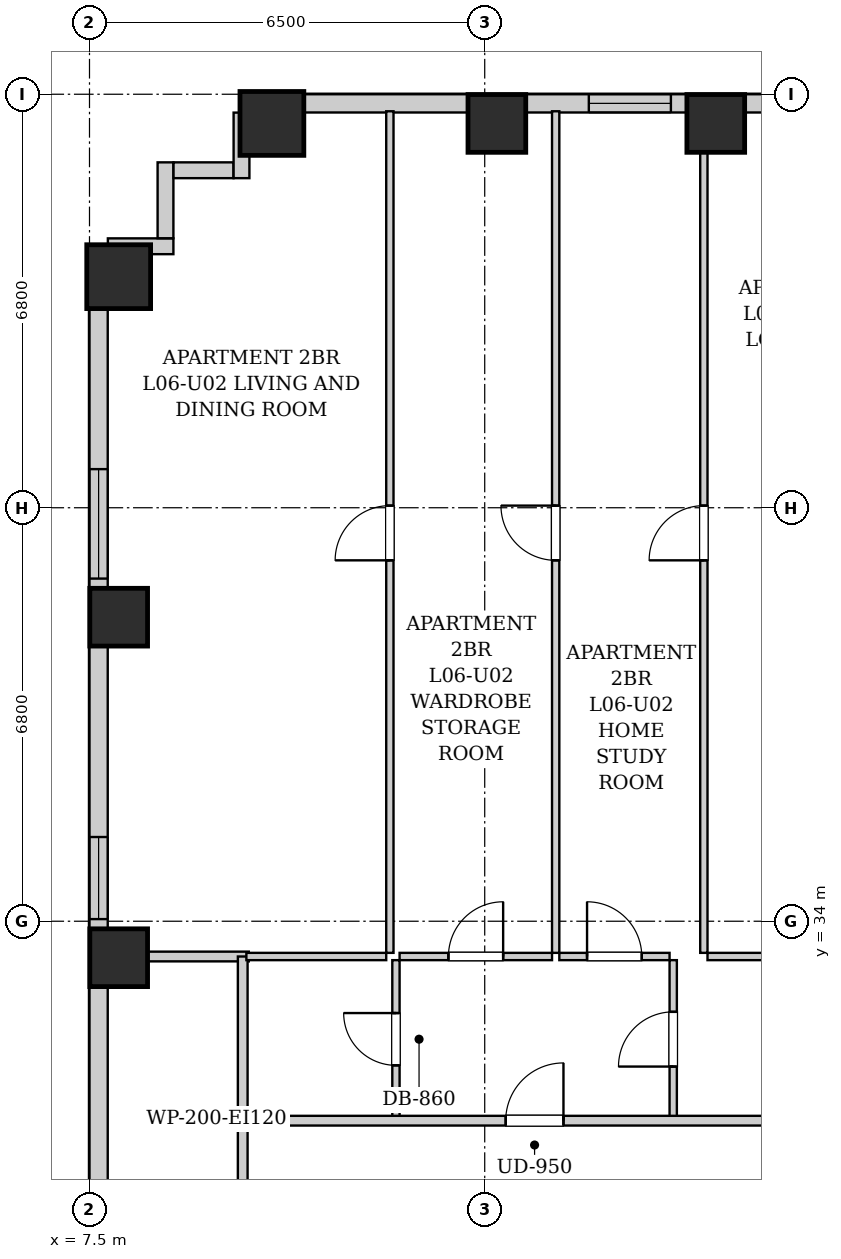
"""IFC4 building model, lengths in metres.
Left out: names, types, materials, properties, quantities, classifications, styles, units other than length and angle.
Written with IfcOpenShell. Run it as: python <this file> out.ifc"""

import sys

from ifc_helpers import new_model, si_unit, direction, frame, frame_2d, origin, origin_2d, place, context, subcontext, project, spatial, rectangle, extrude, element, fill, save


model = new_model("IFC4")
c1 = context("Model", 3, precision=1e-05, world=origin(), true_north=direction((0.0, 1.0)))
c2 = subcontext(c1, "Body", "Model", "MODEL_VIEW")
j1 = project(units=[si_unit("LENGTHUNIT", "METRE"), si_unit("PLANEANGLEUNIT", "RADIAN")], contexts=[c1])
p1 = place(None, origin())
s1 = spatial("IfcSite", under=j1, at=p1, CompositionType="ELEMENT")
p2 = place(p1, origin())
s2 = spatial("IfcBuilding", under=s1, at=p2, CompositionType="ELEMENT")
p3 = place(p2, frame((0.0, 0.0, 29.0)))
s3 = spatial("IfcBuildingStorey", under=s2, at=p3, CompositionType="ELEMENT", Elevation=29.0)
p4 = place(p3, frame((10.5, 47.12, 0.0), z_axis=(0.0, 0.0, 1.0), x_axis=(1.0, 0.0, 0.0)))
e1 = element("IfcColumn", 1, at=p4, inside=s3, PredefinedType="COLUMN", context=c2, shape_type="SweptSolid", body=[
    extrude(rectangle(XDim=1.05, YDim=1.05, at=origin_2d()), origin(), (0.0, 0.0, 1.0), 3.2),
])
for number, where, z_axis, x_axis in (
    (2, (14.2, 47.12, 0.0), (0.0, 0.0, 1.0), (1.0, 0.0, 0.0)),
    (3, (17.8, 47.12, 0.0), (0.0, 0.0, 1.0), (1.0, 0.0, 0.0)),
    (4, (7.98, 33.4, 0.0), (0.0, 0.0, 1.0), (1.0, 0.0, 0.0)),
    (5, (7.98, 39.0, 0.0), (0.0, 0.0, 1.0), (1.0, 0.0, 0.0)),
):
    element("IfcColumn", number, at=place(p3, frame(where, z_axis=z_axis, x_axis=x_axis)), inside=s3, PredefinedType="COLUMN", context=c2, shape_type="SweptSolid", body=[
        extrude(rectangle(XDim=0.95, YDim=0.95, at=origin_2d()), origin(), (0.0, 0.0, 1.0), 3.2),
    ])
p5 = place(p3, frame((7.98, 44.6, 0.0), z_axis=(0.0, 0.0, 1.0), x_axis=(1.0, 0.0, 0.0)))
e6 = element("IfcColumn", 6, at=p5, inside=s3, PredefinedType="COLUMN", context=c2, shape_type="SweptSolid", body=[
    extrude(rectangle(XDim=1.05, YDim=1.05, at=origin_2d()), origin(), (0.0, 0.0, 1.0), 3.2),
])
p6 = place(p3, frame((10.0, 47.45, 0.0), z_axis=(0.0, 0.0, 1.0), x_axis=(1.0, 0.0, 0.0)))
e7 = element("IfcWall", 7, at=p6, inside=s3, PredefinedType="SOLIDWALL", context=c2, shape_type="SweptSolid", body=[
    extrude(rectangle(XDim=28.1, YDim=0.3, at=frame_2d((14.05, 0.0))), origin(), (0.0, 0.0, 1.0), 1.975),
])
p7 = place(p6, frame((5.712, 0.0, 0.55)))
e8 = element("IfcOpeningElement", 8, at=p7, cuts=e7, PredefinedType="OPENING", context=c2, shape_type="SweptSolid", body=[
    extrude(rectangle(XDim=1.35, YDim=1.2, at=frame_2d((0.675, 0.6))), frame((0.0, 0.16, 0.0), z_axis=(0.0, -1.0, 0.0), x_axis=(1.0, 0.0, 0.0)), (0.0, 0.0, 1.0), 0.32),
])
p8 = place(p6, frame((8.792, 0.0, 0.55)))
e9 = element("IfcOpeningElement", 9, at=p8, cuts=e7, PredefinedType="OPENING", context=c2, shape_type="SweptSolid", body=[
    extrude(rectangle(XDim=1.8, YDim=1.2, at=frame_2d((0.9, 0.6))), frame((0.0, 0.16, 0.0), z_axis=(0.0, -1.0, 0.0), x_axis=(1.0, 0.0, 0.0)), (0.0, 0.0, 1.0), 0.32),
])
p9 = place(p6, frame((18.86, 0.0, 0.55)))
e10 = element("IfcOpeningElement", 10, at=p9, cuts=e7, PredefinedType="OPENING", context=c2, shape_type="SweptSolid", body=[
    extrude(rectangle(XDim=1.8, YDim=1.2, at=frame_2d((0.9, 0.6))), frame((0.0, 0.16, 0.0), z_axis=(0.0, -1.0, 0.0), x_axis=(1.0, 0.0, 0.0)), (0.0, 0.0, 1.0), 0.32),
])
p10 = place(p6, frame((21.215, 0.0, 0.55)))
e11 = element("IfcOpeningElement", 11, at=p10, cuts=e7, PredefinedType="OPENING", context=c2, shape_type="SweptSolid", body=[
    extrude(rectangle(XDim=1.35, YDim=1.2, at=frame_2d((0.675, 0.6))), frame((0.0, 0.16, 0.0), z_axis=(0.0, -1.0, 0.0), x_axis=(1.0, 0.0, 0.0)), (0.0, 0.0, 1.0), 0.32),
])
p11 = place(p6, frame((23.969, 0.0, 0.55)))
e12 = element("IfcOpeningElement", 12, at=p11, cuts=e7, PredefinedType="OPENING", context=c2, shape_type="SweptSolid", body=[
    extrude(rectangle(XDim=1.8, YDim=1.2, at=frame_2d((0.9, 0.6))), frame((0.0, 0.16, 0.0), z_axis=(0.0, -1.0, 0.0), x_axis=(1.0, 0.0, 0.0)), (0.0, 0.0, 1.0), 0.32),
])
p12 = place(p6, frame((26.698, 0.0, 0.55)))
e13 = element("IfcOpeningElement", 13, at=p12, cuts=e7, PredefinedType="OPENING", context=c2, shape_type="SweptSolid", body=[
    extrude(rectangle(XDim=0.85, YDim=1.2, at=frame_2d((0.425, 0.6))), frame((0.0, 0.16, 0.0), z_axis=(0.0, -1.0, 0.0), x_axis=(1.0, 0.0, 0.0)), (0.0, 0.0, 1.0), 0.32),
])
p13 = place(p3, frame((7.65, 19.4, 0.0), z_axis=(0.0, 0.0, 1.0), x_axis=(0.0, 1.0, 0.0)))
e14 = element("IfcWall", 14, at=p13, inside=s3, PredefinedType="SOLIDWALL", context=c2, shape_type="SweptSolid", body=[
    extrude(rectangle(XDim=25.7, YDim=0.3, at=frame_2d((12.85, 0.0))), origin(), (0.0, 0.0, 1.0), 1.975),
])
p14 = place(p13, frame((20.235, 0.0, 0.55)))
e15 = element("IfcOpeningElement", 15, at=p14, cuts=e14, PredefinedType="OPENING", context=c2, shape_type="SweptSolid", body=[
    extrude(rectangle(XDim=1.8, YDim=1.2, at=frame_2d((0.9, 0.6))), frame((0.0, 0.16, 0.0), z_axis=(0.0, -1.0, 0.0), x_axis=(1.0, 0.0, 0.0)), (0.0, 0.0, 1.0), 0.32),
])
p15 = place(p13, frame((14.635, 0.0, 0.55)))
e16 = element("IfcOpeningElement", 16, at=p15, cuts=e14, PredefinedType="OPENING", context=c2, shape_type="SweptSolid", body=[
    extrude(rectangle(XDim=1.35, YDim=1.2, at=frame_2d((0.675, 0.6))), frame((0.0, 0.16, 0.0), z_axis=(0.0, -1.0, 0.0), x_axis=(1.0, 0.0, 0.0)), (0.0, 0.0, 1.0), 0.32),
])
p16 = place(p3, frame((7.802, 45.1, 0.0), z_axis=(0.0, 0.0, 1.0), x_axis=(1.0, 0.0, 0.0)))
e17 = element("IfcWall", 17, at=p16, inside=s3, PredefinedType="SOLIDWALL", context=c2, shape_type="SweptSolid", body=[
    extrude(rectangle(XDim=1.078, YDim=0.26, at=frame_2d((0.539, 0.0))), origin(), (0.0, 0.0, 1.0), 2.94),
])
p17 = place(p3, frame((8.75, 45.232, 0.0), z_axis=(0.0, 0.0, 1.0), x_axis=(0.0, 1.0, 0.0)))
e18 = element("IfcWall", 18, at=p17, inside=s3, PredefinedType="SOLIDWALL", context=c2, shape_type="SweptSolid", body=[
    extrude(rectangle(XDim=1.248, YDim=0.26, at=frame_2d((0.624, 0.0))), origin(), (0.0, 0.0, 1.0), 2.94),
])
p18 = place(p3, frame((8.882, 46.35, 0.0), z_axis=(0.0, 0.0, 1.0), x_axis=(1.0, 0.0, 0.0)))
e19 = element("IfcWall", 19, at=p18, inside=s3, PredefinedType="SOLIDWALL", context=c2, shape_type="SweptSolid", body=[
    extrude(rectangle(XDim=0.986, YDim=0.26, at=frame_2d((0.493, 0.0))), origin(), (0.0, 0.0, 1.0), 2.94),
])
p19 = place(p3, frame((10.0, 46.22, 0.0), z_axis=(0.0, 0.0, 1.0), x_axis=(0.0, 1.0, 0.0)))
e20 = element("IfcWall", 20, at=p19, inside=s3, PredefinedType="SOLIDWALL", context=c2, shape_type="SweptSolid", body=[
    extrude(rectangle(XDim=1.078, YDim=0.26, at=frame_2d((0.539, 0.0))), origin(), (0.0, 0.0, 1.0), 2.94),
])
p20 = place(p3, frame((10.02, 28.98, 0.0), z_axis=(0.0, 0.0, 1.0), x_axis=(0.0, 1.0, 0.0)))
e21 = element("IfcWall", 21, at=p20, inside=s3, PredefinedType="PARTITIONING", context=c2, shape_type="SweptSolid", body=[
    extrude(rectangle(XDim=1.74, YDim=0.16, at=frame_2d((0.87, 0.0))), origin(), (0.0, 0.0, 1.0), 2.94),
])
p21 = place(p3, frame((7.78, 33.42, 0.0), z_axis=(0.0, 0.0, 1.0), x_axis=(1.0, 0.0, 0.0)))
e22 = element("IfcWall", 22, at=p21, inside=s3, PredefinedType="PARTITIONING", context=c2, shape_type="SweptSolid", body=[
    extrude(rectangle(XDim=2.34, YDim=0.16, at=frame_2d((1.17, 0.0))), origin(), (0.0, 0.0, 1.0), 2.94),
])
p22 = place(p3, frame((10.02, 30.76, 0.0), z_axis=(0.0, 0.0, 1.0), x_axis=(0.0, 1.0, 0.0)))
e23 = element("IfcWall", 23, at=p22, inside=s3, PredefinedType="PARTITIONING", context=c2, shape_type="SweptSolid", body=[
    extrude(rectangle(XDim=2.66, YDim=0.16, at=frame_2d((1.33, 0.0))), origin(), (0.0, 0.0, 1.0), 2.94),
])
p23 = place(p3, frame((12.54, 30.76, 0.0), z_axis=(0.0, 0.0, 1.0), x_axis=(0.0, 1.0, 0.0)))
e24 = element("IfcWall", 24, at=p23, inside=s3, PredefinedType="PARTITIONING", context=c2, shape_type="SweptSolid", body=[
    extrude(rectangle(XDim=2.6, YDim=0.12, at=frame_2d((1.3, 0.0))), origin(), (0.0, 0.0, 1.0), 2.94),
])
p24 = place(p23, frame((0.87, 0.0, 0.0)))
e25 = element("IfcOpeningElement", 25, at=p24, cuts=e24, PredefinedType="OPENING", context=c2, shape_type="SweptSolid", body=[
    extrude(rectangle(XDim=0.86, YDim=2.05, at=frame_2d((0.43, 1.025))), frame((0.0, 0.07, 0.0), z_axis=(0.0, -1.0, 0.0), x_axis=(1.0, 0.0, 0.0)), (0.0, 0.0, 1.0), 0.14),
])
p25 = place(p3, frame((10.08, 33.42, 0.0), z_axis=(0.0, 0.0, 1.0), x_axis=(1.0, 0.0, 0.0)))
e26 = element("IfcWall", 26, at=p25, inside=s3, PredefinedType="PARTITIONING", context=c2, shape_type="SweptSolid", body=[
    extrude(rectangle(XDim=2.3, YDim=0.12, at=frame_2d((1.15, 0.0))), origin(), (0.0, 0.0, 1.0), 2.94),
])
p26 = place(p3, frame((17.1, 30.76, 0.0), z_axis=(0.0, 0.0, 1.0), x_axis=(0.0, 1.0, 0.0)))
e27 = element("IfcWall", 27, at=p26, inside=s3, PredefinedType="PARTITIONING", context=c2, shape_type="SweptSolid", body=[
    extrude(rectangle(XDim=2.6, YDim=0.12, at=frame_2d((1.3, 0.0))), origin(), (0.0, 0.0, 1.0), 2.94),
])
p27 = place(p26, frame((0.85, 0.0, 0.0)))
e28 = element("IfcOpeningElement", 28, at=p27, cuts=e27, PredefinedType="OPENING", context=c2, shape_type="SweptSolid", body=[
    extrude(rectangle(XDim=0.9, YDim=2.05, at=frame_2d((0.45, 1.025))), frame((0.0, 0.07, 0.0), z_axis=(0.0, -1.0, 0.0), x_axis=(1.0, 0.0, 0.0)), (0.0, 0.0, 1.0), 0.14),
])
p28 = place(p3, frame((12.6, 33.42, 0.0), z_axis=(0.0, 0.0, 1.0), x_axis=(1.0, 0.0, 0.0)))
e29 = element("IfcWall", 29, at=p28, inside=s3, PredefinedType="PARTITIONING", context=c2, shape_type="SweptSolid", body=[
    extrude(rectangle(XDim=2.507, YDim=0.12, at=frame_2d((1.253, 0.0))), origin(), (0.0, 0.0, 1.0), 2.94),
])
p29 = place(p28, frame((0.803, 0.0, 0.0)))
e30 = element("IfcOpeningElement", 30, at=p29, cuts=e29, PredefinedType="OPENING", context=c2, shape_type="SweptSolid", body=[
    extrude(rectangle(XDim=0.9, YDim=2.05, at=frame_2d((0.45, 1.025))), frame((0.0, 0.07, 0.0), z_axis=(0.0, -1.0, 0.0), x_axis=(1.0, 0.0, 0.0)), (0.0, 0.0, 1.0), 0.14),
])
p30 = place(p3, frame((15.227, 33.42, 0.0), z_axis=(0.0, 0.0, 1.0), x_axis=(1.0, 0.0, 0.0)))
e31 = element("IfcWall", 31, at=p30, inside=s3, PredefinedType="PARTITIONING", context=c2, shape_type="SweptSolid", body=[
    extrude(rectangle(XDim=1.813, YDim=0.12, at=frame_2d((0.906, 0.0))), origin(), (0.0, 0.0, 1.0), 2.94),
])
p31 = place(p30, frame((0.456, 0.0, 0.0)))
e32 = element("IfcOpeningElement", 32, at=p31, cuts=e31, PredefinedType="OPENING", context=c2, shape_type="SweptSolid", body=[
    extrude(rectangle(XDim=0.9, YDim=2.05, at=frame_2d((0.45, 1.025))), frame((0.0, 0.07, 0.0), z_axis=(0.0, -1.0, 0.0), x_axis=(1.0, 0.0, 0.0)), (0.0, 0.0, 1.0), 0.14),
])
p32 = place(p3, frame((17.664, 33.42, 0.0), z_axis=(0.0, 0.0, 1.0), x_axis=(1.0, 0.0, 0.0)))
e33 = element("IfcWall", 33, at=p32, inside=s3, PredefinedType="PARTITIONING", context=c2, shape_type="SweptSolid", body=[
    extrude(rectangle(XDim=3.096, YDim=0.12, at=frame_2d((1.548, 0.0))), origin(), (0.0, 0.0, 1.0), 2.94),
])
p33 = place(p32, frame((1.098, 0.0, 0.0)))
e34 = element("IfcOpeningElement", 34, at=p33, cuts=e33, PredefinedType="OPENING", context=c2, shape_type="SweptSolid", body=[
    extrude(rectangle(XDim=0.9, YDim=2.05, at=frame_2d((0.45, 1.025))), frame((0.0, 0.07, 0.0), z_axis=(0.0, -1.0, 0.0), x_axis=(1.0, 0.0, 0.0)), (0.0, 0.0, 1.0), 0.14),
])
p34 = place(p3, frame((12.44, 33.48, 0.0), z_axis=(0.0, 0.0, 1.0), x_axis=(0.0, 1.0, 0.0)))
e35 = element("IfcWall", 35, at=p34, inside=s3, PredefinedType="PARTITIONING", context=c2, shape_type="SweptSolid", body=[
    extrude(rectangle(XDim=13.84, YDim=0.12, at=frame_2d((6.92, 0.0))), origin(), (0.0, 0.0, 1.0), 2.94),
])
p35 = place(p34, frame((6.455, 0.0, 0.0)))
e36 = element("IfcOpeningElement", 36, at=p35, cuts=e35, PredefinedType="OPENING", context=c2, shape_type="SweptSolid", body=[
    extrude(rectangle(XDim=0.9, YDim=2.05, at=frame_2d((0.45, 1.025))), frame((0.0, 0.07, 0.0), z_axis=(0.0, -1.0, 0.0), x_axis=(1.0, 0.0, 0.0)), (0.0, 0.0, 1.0), 0.14),
])
p36 = place(p3, frame((15.167, 33.48, 0.0), z_axis=(0.0, 0.0, 1.0), x_axis=(0.0, 1.0, 0.0)))
e37 = element("IfcWall", 37, at=p36, inside=s3, PredefinedType="PARTITIONING", context=c2, shape_type="SweptSolid", body=[
    extrude(rectangle(XDim=13.84, YDim=0.12, at=frame_2d((6.92, 0.0))), origin(), (0.0, 0.0, 1.0), 2.94),
])
p37 = place(p36, frame((6.455, 0.0, 0.0)))
e38 = element("IfcOpeningElement", 38, at=p37, cuts=e37, PredefinedType="OPENING", context=c2, shape_type="SweptSolid", body=[
    extrude(rectangle(XDim=0.9, YDim=2.05, at=frame_2d((0.45, 1.025))), frame((0.0, 0.07, 0.0), z_axis=(0.0, -1.0, 0.0), x_axis=(1.0, 0.0, 0.0)), (0.0, 0.0, 1.0), 0.14),
])
p38 = place(p3, frame((17.604, 33.48, 0.0), z_axis=(0.0, 0.0, 1.0), x_axis=(0.0, 1.0, 0.0)))
e39 = element("IfcWall", 39, at=p38, inside=s3, PredefinedType="PARTITIONING", context=c2, shape_type="SweptSolid", body=[
    extrude(rectangle(XDim=13.84, YDim=0.12, at=frame_2d((6.92, 0.0))), origin(), (0.0, 0.0, 1.0), 2.94),
])
p39 = place(p38, frame((6.455, 0.0, 0.0)))
e40 = element("IfcOpeningElement", 40, at=p39, cuts=e39, PredefinedType="OPENING", context=c2, shape_type="SweptSolid", body=[
    extrude(rectangle(XDim=0.9, YDim=2.05, at=frame_2d((0.45, 1.025))), frame((0.0, 0.07, 0.0), z_axis=(0.0, -1.0, 0.0), x_axis=(1.0, 0.0, 0.0)), (0.0, 0.0, 1.0), 0.14),
])
p40 = place(p3, frame((10.05, 30.72, 0.0), z_axis=(0.0, 0.0, 1.0), x_axis=(1.0, 0.0, 0.0)))
e41 = element("IfcWall", 41, at=p40, inside=s3, PredefinedType="PARTITIONING", context=c2, shape_type="SweptSolid", body=[
    extrude(rectangle(XDim=33.9, YDim=0.16, at=frame_2d((16.95, 0.0))), origin(), (0.0, 0.0, 1.0), 2.94),
])
p41 = place(p40, frame((4.295, 0.0, 0.0)))
e42 = element("IfcOpeningElement", 42, at=p41, cuts=e41, PredefinedType="OPENING", context=c2, shape_type="SweptSolid", body=[
    extrude(rectangle(XDim=0.95, YDim=2.1, at=frame_2d((0.475, 1.05))), frame((0.0, 0.09, 0.0), z_axis=(0.0, -1.0, 0.0), x_axis=(1.0, 0.0, 0.0)), (0.0, 0.0, 1.0), 0.18),
])
p42 = place(p40, frame((27.235, 0.0, 0.0)))
e43 = element("IfcOpeningElement", 43, at=p42, cuts=e41, PredefinedType="OPENING", context=c2, shape_type="SweptSolid", body=[
    extrude(rectangle(XDim=0.95, YDim=2.1, at=frame_2d((0.475, 1.05))), frame((0.0, 0.09, 0.0), z_axis=(0.0, -1.0, 0.0), x_axis=(1.0, 0.0, 0.0)), (0.0, 0.0, 1.0), 0.18),
])
p43 = place(p24, origin())
e44 = element("IfcDoor", 44, at=p43, inside=s3, OperationType="SINGLE_SWING_RIGHT", PredefinedType="DOOR", context=c2, shape_type="SweptSolid", body=[
    extrude(rectangle(XDim=0.86, YDim=2.05, at=frame_2d((0.43, 1.025))), frame((0.0, 0.025, 0.0), z_axis=(0.0, -1.0, 0.0), x_axis=(1.0, 0.0, 0.0)), (0.0, 0.0, 1.0), 0.05),
])
fill(e25, e44)
p44 = place(p27, origin())
e45 = element("IfcDoor", 45, at=p44, inside=s3, OperationType="SINGLE_SWING_LEFT", PredefinedType="DOOR", context=c2, shape_type="SweptSolid", body=[
    extrude(rectangle(XDim=0.9, YDim=2.05, at=frame_2d((0.45, 1.025))), frame((0.0, 0.025, 0.0), z_axis=(0.0, -1.0, 0.0), x_axis=(1.0, 0.0, 0.0)), (0.0, 0.0, 1.0), 0.05),
])
fill(e28, e45)
p45 = place(p29, origin())
e46 = element("IfcDoor", 46, at=p45, inside=s3, OperationType="SINGLE_SWING_RIGHT", PredefinedType="DOOR", context=c2, shape_type="SweptSolid", body=[
    extrude(rectangle(XDim=0.9, YDim=2.05, at=frame_2d((0.45, 1.025))), frame((0.0, 0.025, 0.0), z_axis=(0.0, -1.0, 0.0), x_axis=(1.0, 0.0, 0.0)), (0.0, 0.0, 1.0), 0.05),
])
fill(e30, e46)
p46 = place(p31, origin())
e47 = element("IfcDoor", 47, at=p46, inside=s3, OperationType="SINGLE_SWING_LEFT", PredefinedType="DOOR", context=c2, shape_type="SweptSolid", body=[
    extrude(rectangle(XDim=0.9, YDim=2.05, at=frame_2d((0.45, 1.025))), frame((0.0, 0.025, 0.0), z_axis=(0.0, -1.0, 0.0), x_axis=(1.0, 0.0, 0.0)), (0.0, 0.0, 1.0), 0.05),
])
fill(e32, e47)
p47 = place(p35, origin())
e48 = element("IfcDoor", 48, at=p47, inside=s3, OperationType="SINGLE_SWING_LEFT", PredefinedType="DOOR", context=c2, shape_type="SweptSolid", body=[
    extrude(rectangle(XDim=0.9, YDim=2.05, at=frame_2d((0.45, 1.025))), frame((0.0, 0.025, 0.0), z_axis=(0.0, -1.0, 0.0), x_axis=(1.0, 0.0, 0.0)), (0.0, 0.0, 1.0), 0.05),
])
fill(e36, e48)
p48 = place(p37, origin())
e49 = element("IfcDoor", 49, at=p48, inside=s3, OperationType="SINGLE_SWING_RIGHT", PredefinedType="DOOR", context=c2, shape_type="SweptSolid", body=[
    extrude(rectangle(XDim=0.9, YDim=2.05, at=frame_2d((0.45, 1.025))), frame((0.0, 0.025, 0.0), z_axis=(0.0, -1.0, 0.0), x_axis=(1.0, 0.0, 0.0)), (0.0, 0.0, 1.0), 0.05),
])
fill(e38, e49)
p49 = place(p39, origin())
e50 = element("IfcDoor", 50, at=p49, inside=s3, OperationType="SINGLE_SWING_LEFT", PredefinedType="DOOR", context=c2, shape_type="SweptSolid", body=[
    extrude(rectangle(XDim=0.9, YDim=2.05, at=frame_2d((0.45, 1.025))), frame((0.0, 0.025, 0.0), z_axis=(0.0, -1.0, 0.0), x_axis=(1.0, 0.0, 0.0)), (0.0, 0.0, 1.0), 0.05),
])
fill(e40, e50)
p50 = place(p41, origin())
e51 = element("IfcDoor", 51, at=p50, inside=s3, OperationType="SINGLE_SWING_RIGHT", PredefinedType="DOOR", context=c2, shape_type="SweptSolid", body=[
    extrude(rectangle(XDim=0.95, YDim=2.1, at=frame_2d((0.475, 1.05))), frame((0.0, 0.025, 0.0), z_axis=(0.0, -1.0, 0.0), x_axis=(1.0, 0.0, 0.0)), (0.0, 0.0, 1.0), 0.05),
])
fill(e42, e51)
p51 = place(p14, origin())
e52 = element("IfcWindow", 52, at=p51, inside=s3, PartitioningType="DOUBLE_PANEL_VERTICAL", PredefinedType="WINDOW", context=c2, shape_type="SweptSolid", body=[
    extrude(rectangle(XDim=1.8, YDim=1.2, at=frame_2d((0.9, 0.6))), frame((0.0, 0.03, 0.0), z_axis=(0.0, -1.0, 0.0), x_axis=(1.0, 0.0, 0.0)), (0.0, 0.0, 1.0), 0.06),
])
fill(e15, e52)
p52 = place(p15, origin())
e53 = element("IfcWindow", 53, at=p52, inside=s3, PartitioningType="SINGLE_PANEL", PredefinedType="WINDOW", context=c2, shape_type="SweptSolid", body=[
    extrude(rectangle(XDim=1.35, YDim=1.2, at=frame_2d((0.675, 0.6))), frame((0.0, 0.03, 0.0), z_axis=(0.0, -1.0, 0.0), x_axis=(1.0, 0.0, 0.0)), (0.0, 0.0, 1.0), 0.06),
])
fill(e16, e53)
p53 = place(p7, origin())
e54 = element("IfcWindow", 54, at=p53, inside=s3, PartitioningType="SINGLE_PANEL", PredefinedType="WINDOW", context=c2, shape_type="SweptSolid", body=[
    extrude(rectangle(XDim=1.35, YDim=1.2, at=frame_2d((0.675, 0.6))), frame((0.0, 0.03, 0.0), z_axis=(0.0, -1.0, 0.0), x_axis=(1.0, 0.0, 0.0)), (0.0, 0.0, 1.0), 0.06),
])
fill(e8, e54)
save(model, sys.argv[1])
